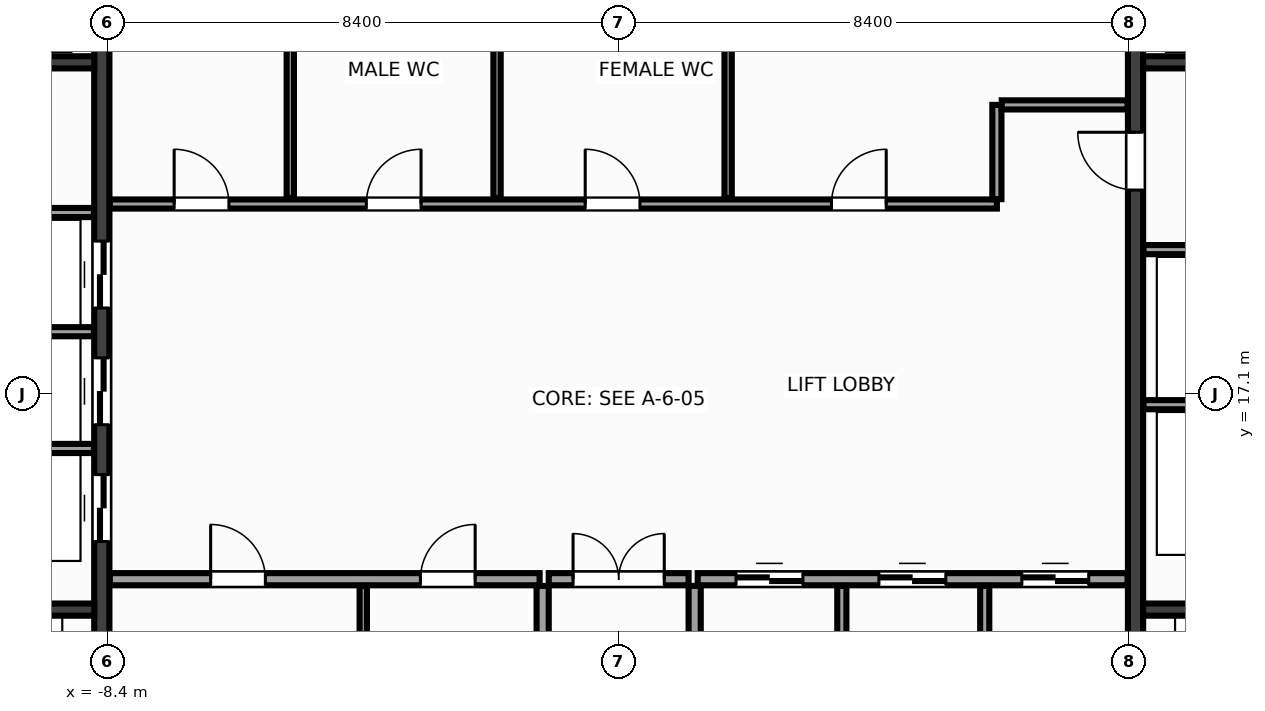
"""IFC4 building model, lengths in metres.
Left out: names, types, materials, properties, quantities, classifications, styles, units other than length and angle.
Written with IfcOpenShell. Run it as: python <this file> out.ifc"""

import sys

from ifc_helpers import new_model, si_unit, direction, frame, frame_2d, origin, place, context, subcontext, project, spatial, rectangle, extrude, source, transform, mapped, element, fill, save


model = new_model("IFC4")
c1 = context("Model", 3, precision=1e-05, world=origin(), true_north=direction((0.0, 1.0)))
c2 = subcontext(c1, "Body", "Model", "MODEL_VIEW")
j1 = project(units=[si_unit("LENGTHUNIT", "METRE"), si_unit("PLANEANGLEUNIT", "RADIAN")], contexts=[c1])
p1 = place(None, origin())
s1 = spatial("IfcSite", under=j1, at=p1, CompositionType="ELEMENT")
p2 = place(p1, origin())
s2 = spatial("IfcBuilding", under=s1, at=p2, CompositionType="ELEMENT")
p3 = place(p2, frame((0.0, 0.0, 156.8)))
s3 = spatial("IfcBuildingStorey", under=s2, at=p3, CompositionType="ELEMENT", Elevation=156.8)
m1 = source(origin(), c2, "Body", "SweptSolid", [
    extrude(rectangle(XDim=12.95, YDim=0.25, at=frame_2d((6.475, 0.0))), origin(), (0.0, 0.0, 1.0), 3.6),
])
p4 = place(p3, frame((-8.5, 10.525, 0.0), z_axis=(0.0, 0.0, 1.0), x_axis=(0.0, 1.0, 0.0)))
e1 = element("IfcWall", 1, at=p4, inside=s3, PredefinedType="SHEAR", context=c2, shape_type="MappedRepresentation", body=[
    mapped(m1, transform((0.0, 0.0, 0.0), x_axis=(1.0, 0.0, 0.0), y_axis=(0.0, 1.0, 0.0), z_axis=(0.0, 0.0, 1.0), scale=1.0)),
])
p5 = place(p4, frame((4.145, 0.0, 0.0)))
e2 = element("IfcOpeningElement", 2, at=p5, cuts=e1, PredefinedType="OPENING", context=c2, shape_type="SweptSolid", body=[
    extrude(rectangle(XDim=1.1, YDim=2.15, at=frame_2d((0.55, 1.075))), frame((0.0, 0.137, 0.0), z_axis=(0.0, -1.0, 0.0), x_axis=(1.0, 0.0, 0.0)), (0.0, 0.0, 1.0), 0.274),
])
p6 = place(p4, frame((6.065, 0.0, 0.0)))
e3 = element("IfcOpeningElement", 3, at=p6, cuts=e1, PredefinedType="OPENING", context=c2, shape_type="SweptSolid", body=[
    extrude(rectangle(XDim=1.1, YDim=2.15, at=frame_2d((0.55, 1.075))), frame((0.0, 0.137, 0.0), z_axis=(0.0, -1.0, 0.0), x_axis=(1.0, 0.0, 0.0)), (0.0, 0.0, 1.0), 0.274),
])
p7 = place(p4, frame((7.985, 0.0, 0.0)))
e4 = element("IfcOpeningElement", 4, at=p7, cuts=e1, PredefinedType="OPENING", context=c2, shape_type="SweptSolid", body=[
    extrude(rectangle(XDim=1.1, YDim=2.15, at=frame_2d((0.55, 1.075))), frame((0.0, 0.137, 0.0), z_axis=(0.0, -1.0, 0.0), x_axis=(1.0, 0.0, 0.0)), (0.0, 0.0, 1.0), 0.274),
])
p8 = place(p3, frame((8.5, 10.525, 0.0), z_axis=(0.0, 0.0, 1.0), x_axis=(0.0, 1.0, 0.0)))
e5 = element("IfcWall", 5, at=p8, inside=s3, PredefinedType="SHEAR", context=c2, shape_type="MappedRepresentation", body=[
    mapped(m1, transform((0.0, 0.0, 0.0), x_axis=(1.0, 0.0, 0.0), y_axis=(0.0, 1.0, 0.0), z_axis=(0.0, 0.0, 1.0), scale=1.0)),
])
p9 = place(p8, frame((9.925, 0.0, 0.0)))
e6 = element("IfcOpeningElement", 6, at=p9, cuts=e5, PredefinedType="OPENING", context=c2, shape_type="SweptSolid", body=[
    extrude(rectangle(XDim=0.95, YDim=2.15, at=frame_2d((0.475, 1.075))), frame((0.0, 0.137, 0.0), z_axis=(0.0, -1.0, 0.0), x_axis=(1.0, 0.0, 0.0)), (0.0, 0.0, 1.0), 0.274),
])
m2 = source(origin(), c2, "Body", "SweptSolid", [
    extrude(rectangle(XDim=2.825, YDim=0.2, at=frame_2d((1.413, 0.0))), origin(), (0.0, 0.0, 1.0), 3.6),
])
for number, where, z_axis, x_axis in (
    (7, (-11.45, 13.55, 0.0), (0.0, 0.0, 1.0), (1.0, 0.0, 0.0)),
    (8, (8.625, 13.55, 0.0), (0.0, 0.0, 1.0), (1.0, 0.0, 0.0)),
):
    element("IfcWall", number, at=place(p3, frame(where, z_axis=z_axis, x_axis=x_axis)), inside=s3, PredefinedType="SHEAR", context=c2, shape_type="MappedRepresentation", body=[
        mapped(m2, transform((0.0, 0.0, 0.0), x_axis=(1.0, 0.0, 0.0), y_axis=(0.0, 1.0, 0.0), z_axis=(0.0, 0.0, 1.0), scale=1.0)),
    ])
m3 = source(origin(), c2, "Body", "SweptSolid", [
    extrude(rectangle(XDim=3.02, YDim=0.2, at=frame_2d((1.51, 0.0))), origin(), (0.0, 0.0, 1.0), 3.6),
])
for number, where, z_axis, x_axis in (
    (9, (-11.645, 22.55, 0.0), (0.0, 0.0, 1.0), (1.0, 0.0, 0.0)),
    (10, (8.625, 22.55, 0.0), (0.0, 0.0, 1.0), (1.0, 0.0, 0.0)),
):
    element("IfcWall", number, at=place(p3, frame(where, z_axis=z_axis, x_axis=x_axis)), inside=s3, PredefinedType="SHEAR", context=c2, shape_type="MappedRepresentation", body=[
        mapped(m3, transform((0.0, 0.0, 0.0), x_axis=(1.0, 0.0, 0.0), y_axis=(0.0, 1.0, 0.0), z_axis=(0.0, 0.0, 1.0), scale=1.0)),
    ])
m4 = source(origin(), c2, "Body", "SweptSolid", [
    extrude(rectangle(XDim=3.01, YDim=0.15, at=frame_2d((1.505, 0.0))), origin(), (0.0, 0.0, 1.0), 3.38),
])
for number, where, z_axis, x_axis in (
    (11, (-11.64, 16.2, 0.0), (0.0, 0.0, 1.0), (1.0, 0.0, 0.0)),
    (12, (-11.64, 18.12, 0.0), (0.0, 0.0, 1.0), (1.0, 0.0, 0.0)),
    (13, (-11.64, 20.08, 0.0), (0.0, 0.0, 1.0), (1.0, 0.0, 0.0)),
    (14, (8.63, 16.92, 0.0), (0.0, 0.0, 1.0), (1.0, 0.0, 0.0)),
    (15, (8.63, 19.47, 0.0), (0.0, 0.0, 1.0), (1.0, 0.0, 0.0)),
):
    element("IfcWall", number, at=place(p3, frame(where, z_axis=z_axis, x_axis=x_axis)), inside=s3, PredefinedType="PARTITIONING", context=c2, shape_type="MappedRepresentation", body=[
        mapped(m4, transform((0.0, 0.0, 0.0), x_axis=(1.0, 0.0, 0.0), y_axis=(0.0, 1.0, 0.0), z_axis=(0.0, 0.0, 1.0), scale=1.0)),
    ])
m5 = source(origin(), c2, "Body", "SweptSolid", [
    extrude(rectangle(XDim=7.07, YDim=0.2, at=frame_2d((3.535, 0.0))), origin(), (0.0, 0.0, 1.0), 3.38),
])
p10 = place(p3, frame((-8.37, 14.05, 0.0), z_axis=(0.0, 0.0, 1.0), x_axis=(1.0, 0.0, 0.0)))
e16 = element("IfcWall", 16, at=p10, inside=s3, PredefinedType="PARTITIONING", context=c2, shape_type="MappedRepresentation", body=[
    mapped(m5, transform((0.0, 0.0, 0.0), x_axis=(1.0, 0.0, 0.0), y_axis=(0.0, 1.0, 0.0), z_axis=(0.0, 0.0, 1.0), scale=1.0)),
])
p11 = place(p10, frame((1.66, 0.0, 0.0)))
e17 = element("IfcOpeningElement", 17, at=p11, cuts=e16, PredefinedType="OPENING", context=c2, shape_type="SweptSolid", body=[
    extrude(rectangle(XDim=0.9, YDim=2.15, at=frame_2d((0.45, 1.075))), frame((0.0, 0.112, 0.0), z_axis=(0.0, -1.0, 0.0), x_axis=(1.0, 0.0, 0.0)), (0.0, 0.0, 1.0), 0.224),
])
p12 = place(p10, frame((5.11, 0.0, 0.0)))
e18 = element("IfcOpeningElement", 18, at=p12, cuts=e16, PredefinedType="OPENING", context=c2, shape_type="SweptSolid", body=[
    extrude(rectangle(XDim=0.9, YDim=2.15, at=frame_2d((0.45, 1.075))), frame((0.0, 0.112, 0.0), z_axis=(0.0, -1.0, 0.0), x_axis=(1.0, 0.0, 0.0)), (0.0, 0.0, 1.0), 0.224),
])
p13 = place(p3, frame((1.3, 14.05, 0.0), z_axis=(0.0, 0.0, 1.0), x_axis=(1.0, 0.0, 0.0)))
e19 = element("IfcWall", 19, at=p13, inside=s3, PredefinedType="PARTITIONING", context=c2, shape_type="MappedRepresentation", body=[
    mapped(m5, transform((0.0, 0.0, 0.0), x_axis=(1.0, 0.0, 0.0), y_axis=(0.0, 1.0, 0.0), z_axis=(0.0, 0.0, 1.0), scale=1.0)),
])
p14 = place(p13, frame((0.63, 0.0, 0.0)))
e20 = element("IfcOpeningElement", 20, at=p14, cuts=e19, PredefinedType="OPENING", context=c2, shape_type="SweptSolid", body=[
    extrude(rectangle(XDim=1.1, YDim=2.15, at=frame_2d((0.55, 1.075))), frame((0.0, 0.112, 0.0), z_axis=(0.0, -1.0, 0.0), x_axis=(1.0, 0.0, 0.0)), (0.0, 0.0, 1.0), 0.224),
])
p15 = place(p13, frame((2.98, 0.0, 0.0)))
e21 = element("IfcOpeningElement", 21, at=p15, cuts=e19, PredefinedType="OPENING", context=c2, shape_type="SweptSolid", body=[
    extrude(rectangle(XDim=1.1, YDim=2.15, at=frame_2d((0.55, 1.075))), frame((0.0, 0.112, 0.0), z_axis=(0.0, -1.0, 0.0), x_axis=(1.0, 0.0, 0.0)), (0.0, 0.0, 1.0), 0.224),
])
p16 = place(p13, frame((5.33, 0.0, 0.0)))
e22 = element("IfcOpeningElement", 22, at=p16, cuts=e19, PredefinedType="OPENING", context=c2, shape_type="SweptSolid", body=[
    extrude(rectangle(XDim=1.1, YDim=2.15, at=frame_2d((0.55, 1.075))), frame((0.0, 0.112, 0.0), z_axis=(0.0, -1.0, 0.0), x_axis=(1.0, 0.0, 0.0)), (0.0, 0.0, 1.0), 0.224),
])
m6 = source(origin(), c2, "Body", "SweptSolid", [
    extrude(rectangle(XDim=3.415, YDim=0.2, at=frame_2d((1.708, 0.0))), origin(), (0.0, 0.0, 1.0), 3.38),
])
for number, where, z_axis, x_axis in (
    (23, (-1.25, 10.525, 0.0), (0.0, 0.0, 1.0), (0.0, 1.0, 0.0)),
    (24, (1.25, 10.525, 0.0), (0.0, 0.0, 1.0), (0.0, 1.0, 0.0)),
):
    element("IfcWall", number, at=place(p3, frame(where, z_axis=z_axis, x_axis=x_axis)), inside=s3, PredefinedType="PARTITIONING", context=c2, shape_type="MappedRepresentation", body=[
        mapped(m6, transform((0.0, 0.0, 0.0), x_axis=(1.0, 0.0, 0.0), y_axis=(0.0, 1.0, 0.0), z_axis=(0.0, 0.0, 1.0), scale=1.0)),
    ])
m7 = source(origin(), c2, "Body", "SweptSolid", [
    extrude(rectangle(XDim=2.3, YDim=0.2, at=frame_2d((1.15, 0.0))), origin(), (0.0, 0.0, 1.0), 3.38),
])
p17 = place(p3, frame((-1.15, 14.05, 0.0), z_axis=(0.0, 0.0, 1.0), x_axis=(1.0, 0.0, 0.0)))
e25 = element("IfcWall", 25, at=p17, inside=s3, PredefinedType="PARTITIONING", context=c2, shape_type="MappedRepresentation", body=[
    mapped(m7, transform((0.0, 0.0, 0.0), x_axis=(1.0, 0.0, 0.0), y_axis=(0.0, 1.0, 0.0), z_axis=(0.0, 0.0, 1.0), scale=1.0)),
])
p18 = place(p17, frame((0.4, 0.0, 0.0)))
e26 = element("IfcOpeningElement", 26, at=p18, cuts=e25, PredefinedType="OPENING", context=c2, shape_type="SweptSolid", body=[
    extrude(rectangle(XDim=1.5, YDim=2.2, at=frame_2d((0.75, 1.1))), frame((0.0, 0.112, 0.0), z_axis=(0.0, -1.0, 0.0), x_axis=(1.0, 0.0, 0.0)), (0.0, 0.0, 1.0), 0.224),
])
m8 = source(origin(), c2, "Body", "SweptSolid", [
    extrude(rectangle(XDim=14.59, YDim=0.15, at=frame_2d((7.295, 0.0))), origin(), (0.0, 0.0, 1.0), 3.38),
])
p19 = place(p3, frame((-8.37, 20.22, 0.0), z_axis=(0.0, 0.0, 1.0), x_axis=(1.0, 0.0, 0.0)))
e27 = element("IfcWall", 27, at=p19, inside=s3, PredefinedType="PARTITIONING", context=c2, shape_type="MappedRepresentation", body=[
    mapped(m8, transform((0.0, 0.0, 0.0), x_axis=(1.0, 0.0, 0.0), y_axis=(0.0, 1.0, 0.0), z_axis=(0.0, 0.0, 1.0), scale=1.0)),
])
p20 = place(p19, frame((1.06, 0.0, 0.0)))
e28 = element("IfcOpeningElement", 28, at=p20, cuts=e27, PredefinedType="OPENING", context=c2, shape_type="SweptSolid", body=[
    extrude(rectangle(XDim=0.9, YDim=2.15, at=frame_2d((0.45, 1.075))), frame((0.0, 0.087, 0.0), z_axis=(0.0, -1.0, 0.0), x_axis=(1.0, 0.0, 0.0)), (0.0, 0.0, 1.0), 0.174),
])
p21 = place(p19, frame((4.22, 0.0, 0.0)))
e29 = element("IfcOpeningElement", 29, at=p21, cuts=e27, PredefinedType="OPENING", context=c2, shape_type="SweptSolid", body=[
    extrude(rectangle(XDim=0.9, YDim=2.15, at=frame_2d((0.45, 1.075))), frame((0.0, 0.087, 0.0), z_axis=(0.0, -1.0, 0.0), x_axis=(1.0, 0.0, 0.0)), (0.0, 0.0, 1.0), 0.174),
])
p22 = place(p19, frame((7.82, 0.0, 0.0)))
e30 = element("IfcOpeningElement", 30, at=p22, cuts=e27, PredefinedType="OPENING", context=c2, shape_type="SweptSolid", body=[
    extrude(rectangle(XDim=0.9, YDim=2.15, at=frame_2d((0.45, 1.075))), frame((0.0, 0.087, 0.0), z_axis=(0.0, -1.0, 0.0), x_axis=(1.0, 0.0, 0.0)), (0.0, 0.0, 1.0), 0.174),
])
p23 = place(p19, frame((11.87, 0.0, 0.0)))
e31 = element("IfcOpeningElement", 31, at=p23, cuts=e27, PredefinedType="OPENING", context=c2, shape_type="SweptSolid", body=[
    extrude(rectangle(XDim=0.9, YDim=2.15, at=frame_2d((0.45, 1.075))), frame((0.0, 0.087, 0.0), z_axis=(0.0, -1.0, 0.0), x_axis=(1.0, 0.0, 0.0)), (0.0, 0.0, 1.0), 0.174),
])
m9 = source(origin(), c2, "Body", "SweptSolid", [
    extrude(rectangle(XDim=1.55, YDim=0.15, at=frame_2d((0.775, 0.0))), origin(), (0.0, 0.0, 1.0), 3.38),
])
p24 = place(p3, frame((6.22, 20.3, 0.0), z_axis=(0.0, 0.0, 1.0), x_axis=(0.0, 1.0, 0.0)))
e32 = element("IfcWall", 32, at=p24, inside=s3, PredefinedType="PARTITIONING", context=c2, shape_type="MappedRepresentation", body=[
    mapped(m9, transform((0.0, 0.0, 0.0), x_axis=(1.0, 0.0, 0.0), y_axis=(0.0, 1.0, 0.0), z_axis=(0.0, 0.0, 1.0), scale=1.0)),
])
m10 = source(origin(), c2, "Body", "SweptSolid", [
    extrude(rectangle(XDim=2.07, YDim=0.15, at=frame_2d((1.035, 0.0))), origin(), (0.0, 0.0, 1.0), 3.38),
])
p25 = place(p3, frame((6.3, 21.85, 0.0), z_axis=(0.0, 0.0, 1.0), x_axis=(1.0, 0.0, 0.0)))
e33 = element("IfcWall", 33, at=p25, inside=s3, PredefinedType="PARTITIONING", context=c2, shape_type="MappedRepresentation", body=[
    mapped(m10, transform((0.0, 0.0, 0.0), x_axis=(1.0, 0.0, 0.0), y_axis=(0.0, 1.0, 0.0), z_axis=(0.0, 0.0, 1.0), scale=1.0)),
])
m11 = source(origin(), c2, "Body", "SweptSolid", [
    extrude(rectangle(XDim=3.415, YDim=0.12, at=frame_2d((1.708, 0.0))), origin(), (0.0, 0.0, 1.0), 3.38),
])
p26 = place(p3, frame((-4.2, 10.525, 0.0), z_axis=(0.0, 0.0, 1.0), x_axis=(0.0, 1.0, 0.0)))
e34 = element("IfcWall", 34, at=p26, inside=s3, PredefinedType="PARTITIONING", context=c2, shape_type="MappedRepresentation", body=[
    mapped(m11, transform((0.0, 0.0, 0.0), x_axis=(1.0, 0.0, 0.0), y_axis=(0.0, 1.0, 0.0), z_axis=(0.0, 0.0, 1.0), scale=1.0)),
])
m12 = source(origin(), c2, "Body", "SweptSolid", [
    extrude(rectangle(XDim=3.415, YDim=0.15, at=frame_2d((1.708, 0.0))), origin(), (0.0, 0.0, 1.0), 3.38),
])
for number, where, z_axis, x_axis in (
    (35, (3.67, 10.525, 0.0), (0.0, 0.0, 1.0), (0.0, 1.0, 0.0)),
    (36, (6.02, 10.525, 0.0), (0.0, 0.0, 1.0), (0.0, 1.0, 0.0)),
):
    element("IfcWall", number, at=place(p3, frame(where, z_axis=z_axis, x_axis=x_axis)), inside=s3, PredefinedType="PARTITIONING", context=c2, shape_type="MappedRepresentation", body=[
        mapped(m12, transform((0.0, 0.0, 0.0), x_axis=(1.0, 0.0, 0.0), y_axis=(0.0, 1.0, 0.0), z_axis=(0.0, 0.0, 1.0), scale=1.0)),
    ])
m13 = source(origin(), c2, "Body", "SweptSolid", [
    extrude(rectangle(XDim=3.115, YDim=0.12, at=frame_2d((1.558, 0.0))), origin(), (0.0, 0.0, 1.0), 3.38),
])
for number, where, z_axis, x_axis in (
    (37, (-5.4, 20.32, 0.0), (0.0, 0.0, 1.0), (0.0, 1.0, 0.0)),
    (38, (-2.0, 20.32, 0.0), (0.0, 0.0, 1.0), (0.0, 1.0, 0.0)),
    (39, (1.8, 20.32, 0.0), (0.0, 0.0, 1.0), (0.0, 1.0, 0.0)),
):
    element("IfcWall", number, at=place(p3, frame(where, z_axis=z_axis, x_axis=x_axis)), inside=s3, PredefinedType="PARTITIONING", context=c2, shape_type="MappedRepresentation", body=[
        mapped(m13, transform((0.0, 0.0, 0.0), x_axis=(1.0, 0.0, 0.0), y_axis=(0.0, 1.0, 0.0), z_axis=(0.0, 0.0, 1.0), scale=1.0)),
    ])
m14 = source(origin(), c2, "Body", "SweptSolid", [
    extrude(rectangle(XDim=1.1, YDim=2.15, at=frame_2d((0.55, 1.075))), frame((0.0, 0.025, 0.0), z_axis=(0.0, -1.0, 0.0), x_axis=(1.0, 0.0, 0.0)), (0.0, 0.0, 1.0), 0.05),
])
p27 = place(p5, origin())
e40 = element("IfcDoor", 40, at=p27, inside=s3, OperationType="DOUBLE_DOOR_SLIDING", PredefinedType="DOOR", context=c2, shape_type="MappedRepresentation", body=[
    mapped(m14, transform((0.0, 0.0, 0.0), x_axis=(1.0, 0.0, 0.0), y_axis=(0.0, 1.0, 0.0), z_axis=(0.0, 0.0, 1.0), scale=1.0)),
])
fill(e2, e40)
p28 = place(p6, origin())
e41 = element("IfcDoor", 41, at=p28, inside=s3, OperationType="DOUBLE_DOOR_SLIDING", PredefinedType="DOOR", context=c2, shape_type="MappedRepresentation", body=[
    mapped(m14, transform((0.0, 0.0, 0.0), x_axis=(1.0, 0.0, 0.0), y_axis=(0.0, 1.0, 0.0), z_axis=(0.0, 0.0, 1.0), scale=1.0)),
])
fill(e3, e41)
p29 = place(p7, origin())
e42 = element("IfcDoor", 42, at=p29, inside=s3, OperationType="DOUBLE_DOOR_SLIDING", PredefinedType="DOOR", context=c2, shape_type="MappedRepresentation", body=[
    mapped(m14, transform((0.0, 0.0, 0.0), x_axis=(1.0, 0.0, 0.0), y_axis=(0.0, 1.0, 0.0), z_axis=(0.0, 0.0, 1.0), scale=1.0)),
])
fill(e4, e42)
m15 = source(origin(), c2, "Body", "SweptSolid", [
    extrude(rectangle(XDim=0.95, YDim=2.15, at=frame_2d((0.475, 1.075))), frame((0.0, 0.025, 0.0), z_axis=(0.0, -1.0, 0.0), x_axis=(1.0, 0.0, 0.0)), (0.0, 0.0, 1.0), 0.05),
])
p30 = place(p9, origin())
e43 = element("IfcDoor", 43, at=p30, inside=s3, OperationType="SINGLE_SWING_RIGHT", PredefinedType="DOOR", context=c2, shape_type="MappedRepresentation", body=[
    mapped(m15, transform((0.0, 0.0, 0.0), x_axis=(1.0, 0.0, 0.0), y_axis=(0.0, 1.0, 0.0), z_axis=(0.0, 0.0, 1.0), scale=1.0)),
])
fill(e6, e43)
m16 = source(origin(), c2, "Body", "SweptSolid", [
    extrude(rectangle(XDim=0.9, YDim=2.15, at=frame_2d((0.45, 1.075))), frame((0.0, 0.025, 0.0), z_axis=(0.0, -1.0, 0.0), x_axis=(1.0, 0.0, 0.0)), (0.0, 0.0, 1.0), 0.05),
])
p31 = place(p11, origin())
e44 = element("IfcDoor", 44, at=p31, inside=s3, OperationType="SINGLE_SWING_LEFT", PredefinedType="DOOR", context=c2, shape_type="MappedRepresentation", body=[
    mapped(m16, transform((0.0, 0.0, 0.0), x_axis=(1.0, 0.0, 0.0), y_axis=(0.0, 1.0, 0.0), z_axis=(0.0, 0.0, 1.0), scale=1.0)),
])
fill(e17, e44)
p32 = place(p12, origin())
e45 = element("IfcDoor", 45, at=p32, inside=s3, OperationType="SINGLE_SWING_RIGHT", PredefinedType="DOOR", context=c2, shape_type="MappedRepresentation", body=[
    mapped(m16, transform((0.0, 0.0, 0.0), x_axis=(1.0, 0.0, 0.0), y_axis=(0.0, 1.0, 0.0), z_axis=(0.0, 0.0, 1.0), scale=1.0)),
])
fill(e18, e45)
p33 = place(p14, origin())
e46 = element("IfcDoor", 46, at=p33, inside=s3, OperationType="DOUBLE_DOOR_SLIDING", PredefinedType="DOOR", context=c2, shape_type="MappedRepresentation", body=[
    mapped(m14, transform((0.0, 0.0, 0.0), x_axis=(1.0, 0.0, 0.0), y_axis=(0.0, 1.0, 0.0), z_axis=(0.0, 0.0, 1.0), scale=1.0)),
])
fill(e20, e46)
p34 = place(p15, origin())
e47 = element("IfcDoor", 47, at=p34, inside=s3, OperationType="DOUBLE_DOOR_SLIDING", PredefinedType="DOOR", context=c2, shape_type="MappedRepresentation", body=[
    mapped(m14, transform((0.0, 0.0, 0.0), x_axis=(1.0, 0.0, 0.0), y_axis=(0.0, 1.0, 0.0), z_axis=(0.0, 0.0, 1.0), scale=1.0)),
])
fill(e21, e47)
p35 = place(p16, origin())
e48 = element("IfcDoor", 48, at=p35, inside=s3, OperationType="DOUBLE_DOOR_SLIDING", PredefinedType="DOOR", context=c2, shape_type="MappedRepresentation", body=[
    mapped(m14, transform((0.0, 0.0, 0.0), x_axis=(1.0, 0.0, 0.0), y_axis=(0.0, 1.0, 0.0), z_axis=(0.0, 0.0, 1.0), scale=1.0)),
])
fill(e22, e48)
m17 = source(origin(), c2, "Body", "SweptSolid", [
    extrude(rectangle(XDim=1.5, YDim=2.2, at=frame_2d((0.75, 1.1))), frame((0.0, 0.025, 0.0), z_axis=(0.0, -1.0, 0.0), x_axis=(1.0, 0.0, 0.0)), (0.0, 0.0, 1.0), 0.05),
])
p36 = place(p18, origin())
e49 = element("IfcDoor", 49, at=p36, inside=s3, OperationType="DOUBLE_DOOR_SINGLE_SWING", PredefinedType="DOOR", context=c2, shape_type="MappedRepresentation", body=[
    mapped(m17, transform((0.0, 0.0, 0.0), x_axis=(1.0, 0.0, 0.0), y_axis=(0.0, 1.0, 0.0), z_axis=(0.0, 0.0, 1.0), scale=1.0)),
])
fill(e26, e49)
p37 = place(p20, origin())
e50 = element("IfcDoor", 50, at=p37, inside=s3, OperationType="SINGLE_SWING_LEFT", PredefinedType="DOOR", context=c2, shape_type="MappedRepresentation", body=[
    mapped(m16, transform((0.0, 0.0, 0.0), x_axis=(1.0, 0.0, 0.0), y_axis=(0.0, 1.0, 0.0), z_axis=(0.0, 0.0, 1.0), scale=1.0)),
])
fill(e28, e50)
p38 = place(p21, origin())
e51 = element("IfcDoor", 51, at=p38, inside=s3, OperationType="SINGLE_SWING_RIGHT", PredefinedType="DOOR", context=c2, shape_type="MappedRepresentation", body=[
    mapped(m16, transform((0.0, 0.0, 0.0), x_axis=(1.0, 0.0, 0.0), y_axis=(0.0, 1.0, 0.0), z_axis=(0.0, 0.0, 1.0), scale=1.0)),
])
fill(e29, e51)
p39 = place(p22, origin())
e52 = element("IfcDoor", 52, at=p39, inside=s3, OperationType="SINGLE_SWING_LEFT", PredefinedType="DOOR", context=c2, shape_type="MappedRepresentation", body=[
    mapped(m16, transform((0.0, 0.0, 0.0), x_axis=(1.0, 0.0, 0.0), y_axis=(0.0, 1.0, 0.0), z_axis=(0.0, 0.0, 1.0), scale=1.0)),
])
fill(e30, e52)
p40 = place(p23, origin())
e53 = element("IfcDoor", 53, at=p40, inside=s3, OperationType="SINGLE_SWING_RIGHT", PredefinedType="DOOR", context=c2, shape_type="MappedRepresentation", body=[
    mapped(m16, transform((0.0, 0.0, 0.0), x_axis=(1.0, 0.0, 0.0), y_axis=(0.0, 1.0, 0.0), z_axis=(0.0, 0.0, 1.0), scale=1.0)),
])
fill(e31, e53)
save(model, sys.argv[1])
